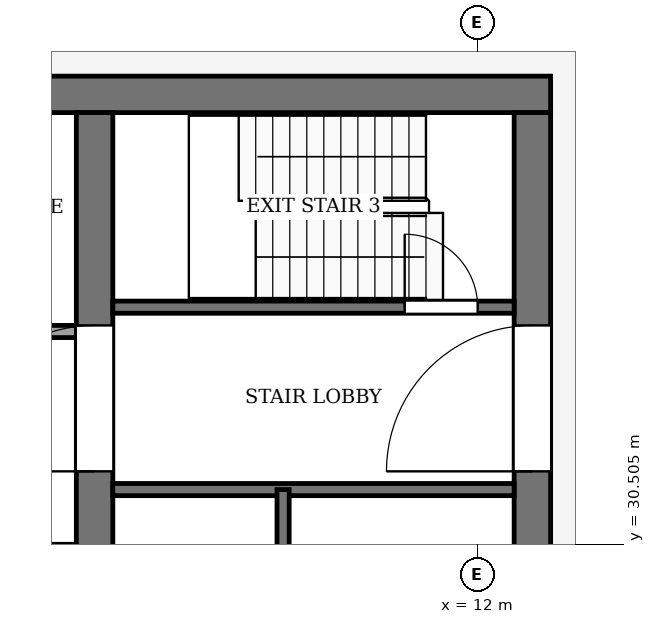
"""IFC4 building model, lengths in metres.
Left out: names, types, materials, properties, quantities, classifications, styles, units other than length and angle.
Written with IfcOpenShell. Run it as: python <this file> out.ifc"""

import sys

from ifc_helpers import new_model, si_unit, direction, frame, frame_2d, origin, place, context, subcontext, project, spatial, rectangle, extrude, element, fill, save


model = new_model("IFC4")
c1 = context("Model", 3, precision=1e-05, world=origin(), true_north=direction((0.0, 1.0)))
c2 = subcontext(c1, "Body", "Model", "MODEL_VIEW")
j1 = project(units=[si_unit("LENGTHUNIT", "METRE"), si_unit("PLANEANGLEUNIT", "RADIAN")], contexts=[c1])
p1 = place(None, origin())
s1 = spatial("IfcSite", under=j1, at=p1, CompositionType="ELEMENT")
p2 = place(p1, origin())
s2 = spatial("IfcBuilding", under=s1, at=p2, CompositionType="ELEMENT")
p3 = place(p2, frame((0.0, 0.0, 330.0)))
s3 = spatial("IfcBuildingStorey", under=s2, at=p3, CompositionType="ELEMENT", Elevation=330.0)
p4 = place(p3, frame((-13.2, 37.9, -0.13), z_axis=(0.0, 0.0, 1.0), x_axis=(1.0, 0.0, 0.0)))
e1 = element("IfcWall", 1, at=p4, inside=s3, PredefinedType="SHEAR", context=c2, shape_type="SweptSolid", body=[
    extrude(rectangle(XDim=26.4, YDim=0.6, at=frame_2d((13.2, 0.0))), origin(), (0.0, 0.0, 1.0), 3.95),
])
p5 = place(p3, frame((12.9, 18.4, -0.13), z_axis=(0.0, 0.0, 1.0), x_axis=(0.0, 1.0, 0.0)))
e2 = element("IfcWall", 2, at=p5, inside=s3, PredefinedType="SHEAR", context=c2, shape_type="SweptSolid", body=[
    extrude(rectangle(XDim=19.2, YDim=0.6, at=frame_2d((9.6, 0.0))), origin(), (0.0, 0.0, 1.0), 3.95),
])
p6 = place(p5, frame((2.8, 0.0, 0.13)))
e3 = element("IfcOpeningElement", 3, at=p6, cuts=e2, PredefinedType="OPENING", context=c2, shape_type="SweptSolid", body=[
    extrude(rectangle(XDim=2.4, YDim=2.4, at=frame_2d((1.2, 1.2))), frame((0.0, 0.31, 0.0), z_axis=(0.0, -1.0, 0.0), x_axis=(1.0, 0.0, 0.0)), (0.0, 0.0, 1.0), 0.62),
])
p7 = place(p5, frame((13.3, 0.0, 0.13)))
e4 = element("IfcOpeningElement", 4, at=p7, cuts=e2, PredefinedType="OPENING", context=c2, shape_type="SweptSolid", body=[
    extrude(rectangle(XDim=2.4, YDim=2.4, at=frame_2d((1.2, 1.2))), frame((0.0, 0.31, 0.0), z_axis=(0.0, -1.0, 0.0), x_axis=(1.0, 0.0, 0.0)), (0.0, 0.0, 1.0), 0.62),
])
p8 = place(p3, frame((5.7, 18.4, -0.13), z_axis=(0.0, 0.0, 1.0), x_axis=(0.0, 1.0, 0.0)))
e5 = element("IfcWall", 5, at=p8, inside=s3, PredefinedType="SHEAR", context=c2, shape_type="SweptSolid", body=[
    extrude(rectangle(XDim=19.2, YDim=0.6, at=frame_2d((9.6, 0.0))), origin(), (0.0, 0.0, 1.0), 3.95),
])
p9 = place(p8, frame((8.35, 0.0, 0.13)))
e6 = element("IfcOpeningElement", 6, at=p9, cuts=e5, PredefinedType="OPENING", context=c2, shape_type="SweptSolid", body=[
    extrude(rectangle(XDim=0.9, YDim=2.1, at=frame_2d((0.45, 1.05))), frame((0.0, 0.31, 0.0), z_axis=(0.0, -1.0, 0.0), x_axis=(1.0, 0.0, 0.0)), (0.0, 0.0, 1.0), 0.62),
])
p10 = place(p8, frame((13.3, 0.0, 0.13)))
e7 = element("IfcOpeningElement", 7, at=p10, cuts=e5, PredefinedType="OPENING", context=c2, shape_type="SweptSolid", body=[
    extrude(rectangle(XDim=2.4, YDim=2.4, at=frame_2d((1.2, 1.2))), frame((0.0, 0.31, 0.0), z_axis=(0.0, -1.0, 0.0), x_axis=(1.0, 0.0, 0.0)), (0.0, 0.0, 1.0), 0.62),
])
p11 = place(p3, frame((6.0, 31.4, 0.0), z_axis=(0.0, 0.0, 1.0), x_axis=(1.0, 0.0, 0.0)))
e8 = element("IfcWall", 8, at=p11, inside=s3, PredefinedType="PARTITIONING", context=c2, shape_type="SweptSolid", body=[
    extrude(rectangle(XDim=6.6, YDim=0.2, at=frame_2d((3.3, 0.0))), origin(), (0.0, 0.0, 1.0), 3.82),
])
p12 = place(p3, frame((-5.4, 34.0, 0.0), z_axis=(0.0, 0.0, 1.0), x_axis=(1.0, 0.0, 0.0)))
e9 = element("IfcWall", 9, at=p12, inside=s3, PredefinedType="PARTITIONING", context=c2, shape_type="SweptSolid", body=[
    extrude(rectangle(XDim=10.8, YDim=0.2, at=frame_2d((5.4, 0.0))), origin(), (0.0, 0.0, 1.0), 3.82),
])
p13 = place(p12, frame((6.15, 0.0, 0.0)))
e10 = element("IfcOpeningElement", 10, at=p13, cuts=e9, PredefinedType="OPENING", context=c2, shape_type="SweptSolid", body=[
    extrude(rectangle(XDim=1.2, YDim=2.2, at=frame_2d((0.6, 1.1))), frame((0.0, 0.11, 0.0), z_axis=(0.0, -1.0, 0.0), x_axis=(1.0, 0.0, 0.0)), (0.0, 0.0, 1.0), 0.22),
])
p14 = place(p12, frame((8.95, 0.0, 0.0)))
e11 = element("IfcOpeningElement", 11, at=p14, cuts=e9, PredefinedType="OPENING", context=c2, shape_type="SweptSolid", body=[
    extrude(rectangle(XDim=1.0, YDim=2.1, at=frame_2d((0.5, 1.05))), frame((0.0, 0.11, 0.0), z_axis=(0.0, -1.0, 0.0), x_axis=(1.0, 0.0, 0.0)), (0.0, 0.0, 1.0), 0.22),
])
p15 = place(p3, frame((6.0, 34.4, 0.0), z_axis=(0.0, 0.0, 1.0), x_axis=(1.0, 0.0, 0.0)))
e12 = element("IfcWall", 12, at=p15, inside=s3, PredefinedType="PARTITIONING", context=c2, shape_type="SweptSolid", body=[
    extrude(rectangle(XDim=6.6, YDim=0.2, at=frame_2d((3.3, 0.0))), origin(), (0.0, 0.0, 1.0), 3.82),
])
p16 = place(p15, frame((4.8, 0.0, 0.0)))
e13 = element("IfcOpeningElement", 13, at=p16, cuts=e12, PredefinedType="OPENING", context=c2, shape_type="SweptSolid", body=[
    extrude(rectangle(XDim=1.2, YDim=2.2, at=frame_2d((0.6, 1.1))), frame((0.0, 0.11, 0.0), z_axis=(0.0, -1.0, 0.0), x_axis=(1.0, 0.0, 0.0)), (0.0, 0.0, 1.0), 0.22),
])
p17 = place(p3, frame((8.8, 24.0, 0.0), z_axis=(0.0, 0.0, 1.0), x_axis=(0.0, 1.0, 0.0)))
e14 = element("IfcWall", 14, at=p17, inside=s3, PredefinedType="PARTITIONING", context=c2, shape_type="SweptSolid", body=[
    extrude(rectangle(XDim=7.4, YDim=0.2, at=frame_2d((3.7, 0.0))), origin(), (0.0, 0.0, 1.0), 3.82),
])
p18 = place(p16, origin())
e15 = element("IfcDoor", 15, at=p18, inside=s3, OperationType="SINGLE_SWING_RIGHT", PredefinedType="DOOR", context=c2, shape_type="SweptSolid", body=[
    extrude(rectangle(XDim=1.2, YDim=2.2, at=frame_2d((0.6, 1.1))), frame((0.0, 0.025, 0.0), z_axis=(0.0, -1.0, 0.0), x_axis=(1.0, 0.0, 0.0)), (0.0, 0.0, 1.0), 0.05),
])
fill(e13, e15)
p19 = place(p10, origin())
e16 = element("IfcDoor", 16, at=p19, inside=s3, OperationType="DOUBLE_DOOR_SINGLE_SWING", PredefinedType="DOOR", context=c2, shape_type="SweptSolid", body=[
    extrude(rectangle(XDim=2.4, YDim=2.4, at=frame_2d((1.2, 1.2))), frame((0.0, 0.025, 0.0), z_axis=(0.0, -1.0, 0.0), x_axis=(1.0, 0.0, 0.0)), (0.0, 0.0, 1.0), 0.05),
])
fill(e7, e16)
p20 = place(p7, origin())
e17 = element("IfcDoor", 17, at=p20, inside=s3, OperationType="DOUBLE_DOOR_SINGLE_SWING", PredefinedType="DOOR", context=c2, shape_type="SweptSolid", body=[
    extrude(rectangle(XDim=2.4, YDim=2.4, at=frame_2d((1.2, 1.2))), frame((0.0, 0.025, 0.0), z_axis=(0.0, -1.0, 0.0), x_axis=(1.0, 0.0, 0.0)), (0.0, 0.0, 1.0), 0.05),
])
fill(e4, e17)
save(model, sys.argv[1])
